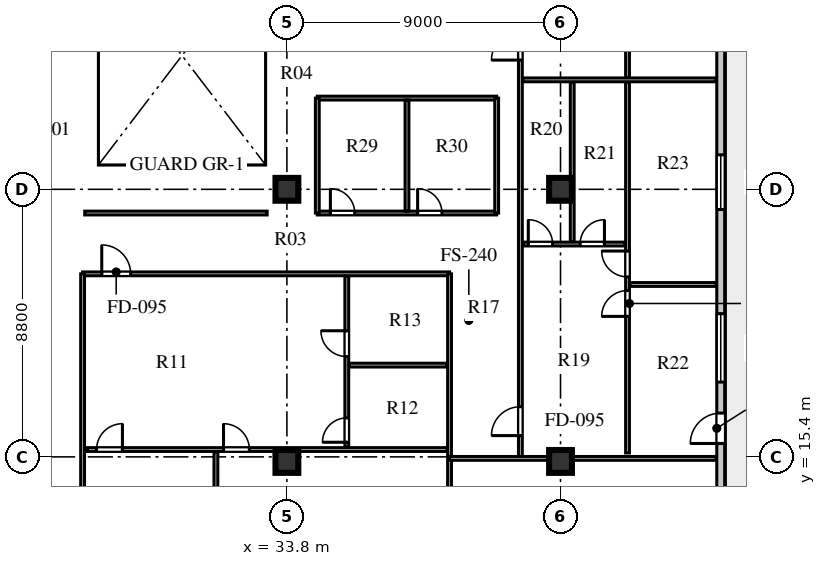
"""IFC4 building model, lengths in metres.
Left out: names, types, materials, properties, quantities, classifications, styles, units other than length and angle.
Written with IfcOpenShell. Run it as: python <this file> out.ifc"""

import sys

from ifc_helpers import new_model, si_unit, direction, frame, frame_2d, origin, origin_2d, place, context, subcontext, project, spatial, rectangle, extrude, element, fill, save


model = new_model("IFC4")
c1 = context("Model", 3, precision=1e-05, world=origin(), true_north=direction((0.0, 1.0)))
c2 = subcontext(c1, "Body", "Model", "MODEL_VIEW")
j1 = project(units=[si_unit("LENGTHUNIT", "METRE"), si_unit("PLANEANGLEUNIT", "RADIAN")], contexts=[c1])
p1 = place(None, origin())
s1 = spatial("IfcSite", under=j1, at=p1, CompositionType="ELEMENT")
p2 = place(p1, origin())
s2 = spatial("IfcBuilding", under=s1, at=p2, CompositionType="ELEMENT")
p3 = place(p2, frame((0.0, 0.0, 280.4)))
s3 = spatial("IfcBuildingStorey", under=s2, at=p3, CompositionType="ELEMENT", Elevation=280.4)
for number, where, z_axis, x_axis in (
    (1, (33.8, 15.25, 0.0), (0.0, 0.0, 1.0), (1.0, 0.0, 0.0)),
    (2, (33.8, 24.2, 0.0), (0.0, 0.0, 1.0), (1.0, 0.0, 0.0)),
    (3, (42.8, 15.25, 0.0), (0.0, 0.0, 1.0), (1.0, 0.0, 0.0)),
    (4, (42.8, 24.2, 0.0), (0.0, 0.0, 1.0), (1.0, 0.0, 0.0)),
):
    element("IfcColumn", number, at=place(p3, frame(where, z_axis=z_axis, x_axis=x_axis)), inside=s3, PredefinedType="COLUMN", context=c2, shape_type="SweptSolid", body=[
        extrude(rectangle(XDim=0.75, YDim=0.75, at=origin_2d()), origin(), (0.0, 0.0, 1.0), 3.66),
    ])
p4 = place(p3, frame((48.07, 13.41, 0.0), z_axis=(0.0, 0.0, 1.0), x_axis=(0.0, 1.0, 0.0)))
e5 = element("IfcWall", 5, at=p4, inside=s3, PredefinedType="SOLIDWALL", context=c2, shape_type="SweptSolid", body=[
    extrude(rectangle(XDim=30.38, YDim=0.26, at=frame_2d((15.19, 0.0))), origin(), (0.0, 0.0, 1.0), 3.66),
])
p5 = place(p4, frame((2.43, 0.0, 0.0)))
e6 = element("IfcOpeningElement", 6, at=p5, cuts=e5, PredefinedType="OPENING", context=c2, shape_type="SweptSolid", body=[
    extrude(rectangle(XDim=1.0, YDim=2.05, at=frame_2d((0.5, 1.025))), frame((0.0, 0.14, 0.0), z_axis=(0.0, -1.0, 0.0), x_axis=(1.0, 0.0, 0.0)), (0.0, 0.0, 1.0), 0.28),
])
p6 = place(p4, frame((4.45, 0.0, 0.8)))
e7 = element("IfcOpeningElement", 7, at=p6, cuts=e5, PredefinedType="OPENING", context=c2, shape_type="SweptSolid", body=[
    extrude(rectangle(XDim=2.25, YDim=2.0, at=frame_2d((1.125, 1.0))), frame((0.0, 0.14, 0.0), z_axis=(0.0, -1.0, 0.0), x_axis=(1.0, 0.0, 0.0)), (0.0, 0.0, 1.0), 0.28),
])
p7 = place(p4, frame((10.125, 0.0, 0.8)))
e8 = element("IfcOpeningElement", 8, at=p7, cuts=e5, PredefinedType="OPENING", context=c2, shape_type="SweptSolid", body=[
    extrude(rectangle(XDim=1.8, YDim=2.0, at=frame_2d((0.9, 1.0))), frame((0.0, 0.14, 0.0), z_axis=(0.0, -1.0, 0.0), x_axis=(1.0, 0.0, 0.0)), (0.0, 0.0, 1.0), 0.28),
])
p8 = place(p4, frame((17.128, 0.0, 0.8)))
e9 = element("IfcOpeningElement", 9, at=p8, cuts=e5, PredefinedType="OPENING", context=c2, shape_type="SweptSolid", body=[
    extrude(rectangle(XDim=1.5, YDim=2.0, at=frame_2d((0.75, 1.0))), frame((0.0, 0.14, 0.0), z_axis=(0.0, -1.0, 0.0), x_axis=(1.0, 0.0, 0.0)), (0.0, 0.0, 1.0), 0.28),
])
p9 = place(p4, frame((24.302, 0.0, 0.8)))
e10 = element("IfcOpeningElement", 10, at=p9, cuts=e5, PredefinedType="OPENING", context=c2, shape_type="SweptSolid", body=[
    extrude(rectangle(XDim=1.2, YDim=1.75, at=frame_2d((0.6, 0.875))), frame((0.0, 0.14, 0.0), z_axis=(0.0, -1.0, 0.0), x_axis=(1.0, 0.0, 0.0)), (0.0, 0.0, 1.0), 0.28),
])
p10 = place(p3, frame((27.08, 21.42, 0.0), z_axis=(0.0, 0.0, 1.0), x_axis=(1.0, 0.0, 0.0)))
e11 = element("IfcWall", 11, at=p10, inside=s3, PredefinedType="PLUMBINGWALL", context=c2, shape_type="SweptSolid", body=[
    extrude(rectangle(XDim=12.07, YDim=0.125, at=frame_2d((6.035, 0.0))), origin(), (0.0, 0.0, 1.0), 3.36),
])
p11 = place(p10, frame((0.63, 0.0, 0.0)))
e12 = element("IfcOpeningElement", 12, at=p11, cuts=e11, PredefinedType="OPENING", context=c2, shape_type="SweptSolid", body=[
    extrude(rectangle(XDim=0.95, YDim=2.1, at=frame_2d((0.475, 1.05))), frame((0.0, 0.073, 0.0), z_axis=(0.0, -1.0, 0.0), x_axis=(1.0, 0.0, 0.0)), (0.0, 0.0, 1.0), 0.145),
])
p12 = place(p3, frame((27.08, 10.38, 0.0), z_axis=(0.0, 0.0, 1.0), x_axis=(0.0, 1.0, 0.0)))
e13 = element("IfcWall", 13, at=p12, inside=s3, PredefinedType="PLUMBINGWALL", context=c2, shape_type="SweptSolid", body=[
    extrude(rectangle(XDim=11.04, YDim=0.125, at=frame_2d((5.52, 0.0))), origin(), (0.0, 0.0, 1.0), 3.66),
])
p13 = place(p3, frame((27.15, 23.42, 0.0), z_axis=(0.0, 0.0, 1.0), x_axis=(1.0, 0.0, 0.0)))
e14 = element("IfcWall", 14, at=p13, inside=s3, PredefinedType="PLUMBINGWALL", context=c2, shape_type="SweptSolid", body=[
    extrude(rectangle(XDim=6.0, YDim=0.125, at=frame_2d((3.0, 0.0))), origin(), (0.0, 0.0, 1.0), 3.66),
])
p14 = place(p3, frame((39.15, 10.38, 0.0), z_axis=(0.0, 0.0, 1.0), x_axis=(0.0, 1.0, 0.0)))
e15 = element("IfcWall", 15, at=p14, inside=s3, PredefinedType="PLUMBINGWALL", context=c2, shape_type="SweptSolid", body=[
    extrude(rectangle(XDim=11.04, YDim=0.125, at=frame_2d((5.52, 0.0))), origin(), (0.0, 0.0, 1.0), 3.66),
])
p15 = place(p3, frame((27.24, 15.641, 0.0), z_axis=(0.0, 0.0, 1.0), x_axis=(1.0, 0.0, 0.0)))
e16 = element("IfcWall", 16, at=p15, inside=s3, PredefinedType="PLUMBINGWALL", context=c2, shape_type="SweptSolid", body=[
    extrude(rectangle(XDim=11.83, YDim=0.125, at=frame_2d((5.915, 0.0))), origin(), (0.0, 0.0, 1.0), 3.66),
])
p16 = place(p15, frame((0.3, 0.0, 0.0)))
e17 = element("IfcOpeningElement", 17, at=p16, cuts=e16, PredefinedType="OPENING", context=c2, shape_type="SweptSolid", body=[
    extrude(rectangle(XDim=0.85, YDim=2.08, at=frame_2d((0.425, 1.04))), frame((0.0, 0.073, 0.0), z_axis=(0.0, -1.0, 0.0), x_axis=(1.0, 0.0, 0.0)), (0.0, 0.0, 1.0), 0.145),
])
p17 = place(p15, frame((4.475, 0.0, 0.0)))
e18 = element("IfcOpeningElement", 18, at=p17, cuts=e16, PredefinedType="OPENING", context=c2, shape_type="SweptSolid", body=[
    extrude(rectangle(XDim=0.85, YDim=2.08, at=frame_2d((0.425, 1.04))), frame((0.0, 0.073, 0.0), z_axis=(0.0, -1.0, 0.0), x_axis=(1.0, 0.0, 0.0)), (0.0, 0.0, 1.0), 0.145),
])
p18 = place(p3, frame((35.77, 15.721, 0.0), z_axis=(0.0, 0.0, 1.0), x_axis=(0.0, 1.0, 0.0)))
e19 = element("IfcWall", 19, at=p18, inside=s3, PredefinedType="PLUMBINGWALL", context=c2, shape_type="SweptSolid", body=[
    extrude(rectangle(XDim=5.619, YDim=0.125, at=frame_2d((2.81, 0.0))), origin(), (0.0, 0.0, 1.0), 3.66),
])
p19 = place(p18, frame((0.16, 0.0, 0.0)))
e20 = element("IfcOpeningElement", 20, at=p19, cuts=e19, PredefinedType="OPENING", context=c2, shape_type="SweptSolid", body=[
    extrude(rectangle(XDim=0.8, YDim=2.05, at=frame_2d((0.4, 1.025))), frame((0.0, 0.073, 0.0), z_axis=(0.0, -1.0, 0.0), x_axis=(1.0, 0.0, 0.0)), (0.0, 0.0, 1.0), 0.145),
])
p20 = place(p18, frame((2.977, 0.0, 0.0)))
e21 = element("IfcOpeningElement", 21, at=p20, cuts=e19, PredefinedType="OPENING", context=c2, shape_type="SweptSolid", body=[
    extrude(rectangle(XDim=0.85, YDim=2.08, at=frame_2d((0.425, 1.04))), frame((0.0, 0.073, 0.0), z_axis=(0.0, -1.0, 0.0), x_axis=(1.0, 0.0, 0.0)), (0.0, 0.0, 1.0), 0.145),
])
p21 = place(p3, frame((35.85, 18.418, 0.0), z_axis=(0.0, 0.0, 1.0), x_axis=(1.0, 0.0, 0.0)))
e22 = element("IfcWall", 22, at=p21, inside=s3, PredefinedType="PLUMBINGWALL", context=c2, shape_type="SweptSolid", body=[
    extrude(rectangle(XDim=3.22, YDim=0.125, at=frame_2d((1.61, 0.0))), origin(), (0.0, 0.0, 1.0), 3.36),
])
p22 = place(p3, frame((31.465, 10.38, 0.0), z_axis=(0.0, 0.0, 1.0), x_axis=(0.0, 1.0, 0.0)))
e23 = element("IfcWall", 23, at=p22, inside=s3, PredefinedType="PLUMBINGWALL", context=c2, shape_type="SweptSolid", body=[
    extrude(rectangle(XDim=5.181, YDim=0.125, at=frame_2d((2.591, 0.0))), origin(), (0.0, 0.0, 1.0), 3.66),
])
p23 = place(p3, frame((41.48, 15.35, 0.0), z_axis=(0.0, 0.0, 1.0), x_axis=(0.0, 1.0, 0.0)))
e24 = element("IfcWall", 24, at=p23, inside=s3, PredefinedType="PLUMBINGWALL", context=c2, shape_type="SweptSolid", body=[
    extrude(rectangle(XDim=26.5, YDim=0.125, at=frame_2d((13.25, 0.0))), origin(), (0.0, 0.0, 1.0), 3.66),
])
p24 = place(p23, frame((0.75, 0.0, 0.0)))
e25 = element("IfcOpeningElement", 25, at=p24, cuts=e24, PredefinedType="OPENING", context=c2, shape_type="SweptSolid", body=[
    extrude(rectangle(XDim=0.95, YDim=2.1, at=frame_2d((0.475, 1.05))), frame((0.0, 0.073, 0.0), z_axis=(0.0, -1.0, 0.0), x_axis=(1.0, 0.0, 0.0)), (0.0, 0.0, 1.0), 0.145),
])
p25 = place(p23, frame((13.1, 0.0, 0.0)))
e26 = element("IfcOpeningElement", 26, at=p25, cuts=e24, PredefinedType="OPENING", context=c2, shape_type="SweptSolid", body=[
    extrude(rectangle(XDim=0.95, YDim=2.1, at=frame_2d((0.475, 1.05))), frame((0.0, 0.073, 0.0), z_axis=(0.0, -1.0, 0.0), x_axis=(1.0, 0.0, 0.0)), (0.0, 0.0, 1.0), 0.145),
])
p26 = place(p3, frame((39.15, 15.35, 0.0), z_axis=(0.0, 0.0, 1.0), x_axis=(1.0, 0.0, 0.0)))
e27 = element("IfcWall", 27, at=p26, inside=s3, PredefinedType="PLUMBINGWALL", context=c2, shape_type="SweptSolid", body=[
    extrude(rectangle(XDim=8.77, YDim=0.125, at=frame_2d((4.385, 0.0))), origin(), (0.0, 0.0, 1.0), 3.06),
])
p27 = place(p3, frame((45.004, 15.53, 0.0), z_axis=(0.0, 0.0, 1.0), x_axis=(0.0, 1.0, 0.0)))
e28 = element("IfcWall", 28, at=p27, inside=s3, PredefinedType="PLUMBINGWALL", context=c2, shape_type="SweptSolid", body=[
    extrude(rectangle(XDim=12.19, YDim=0.125, at=frame_2d((6.095, 0.0))), origin(), (0.0, 0.0, 1.0), 3.66),
])
p28 = place(p27, frame((4.49, 0.0, 0.0)))
e29 = element("IfcOpeningElement", 29, at=p28, cuts=e28, PredefinedType="OPENING", context=c2, shape_type="SweptSolid", body=[
    extrude(rectangle(XDim=0.85, YDim=2.08, at=frame_2d((0.425, 1.04))), frame((0.0, 0.073, 0.0), z_axis=(0.0, -1.0, 0.0), x_axis=(1.0, 0.0, 0.0)), (0.0, 0.0, 1.0), 0.145),
])
p29 = place(p27, frame((5.79, 0.0, 0.0)))
e30 = element("IfcOpeningElement", 30, at=p29, cuts=e28, PredefinedType="OPENING", context=c2, shape_type="SweptSolid", body=[
    extrude(rectangle(XDim=0.85, YDim=2.08, at=frame_2d((0.425, 1.04))), frame((0.0, 0.073, 0.0), z_axis=(0.0, -1.0, 0.0), x_axis=(1.0, 0.0, 0.0)), (0.0, 0.0, 1.0), 0.145),
])
p30 = place(p3, frame((41.58, 22.4, 0.0), z_axis=(0.0, 0.0, 1.0), x_axis=(1.0, 0.0, 0.0)))
e31 = element("IfcWall", 31, at=p30, inside=s3, PredefinedType="PLUMBINGWALL", context=c2, shape_type="SweptSolid", body=[
    extrude(rectangle(XDim=3.344, YDim=0.125, at=frame_2d((1.672, 0.0))), origin(), (0.0, 0.0, 1.0), 3.66),
])
p31 = place(p30, frame((0.16, 0.0, 0.0)))
e32 = element("IfcOpeningElement", 32, at=p31, cuts=e31, PredefinedType="OPENING", context=c2, shape_type="SweptSolid", body=[
    extrude(rectangle(XDim=0.8, YDim=2.05, at=frame_2d((0.4, 1.025))), frame((0.0, 0.073, 0.0), z_axis=(0.0, -1.0, 0.0), x_axis=(1.0, 0.0, 0.0)), (0.0, 0.0, 1.0), 0.145),
])
p32 = place(p30, frame((1.865, 0.0, 0.0)))
e33 = element("IfcOpeningElement", 33, at=p32, cuts=e31, PredefinedType="OPENING", context=c2, shape_type="SweptSolid", body=[
    extrude(rectangle(XDim=0.8, YDim=2.05, at=frame_2d((0.4, 1.025))), frame((0.0, 0.073, 0.0), z_axis=(0.0, -1.0, 0.0), x_axis=(1.0, 0.0, 0.0)), (0.0, 0.0, 1.0), 0.145),
])
p33 = place(p3, frame((43.185, 22.48, 0.0), z_axis=(0.0, 0.0, 1.0), x_axis=(0.0, 1.0, 0.0)))
e34 = element("IfcWall", 34, at=p33, inside=s3, PredefinedType="PLUMBINGWALL", context=c2, shape_type="SweptSolid", body=[
    extrude(rectangle(XDim=5.24, YDim=0.125, at=frame_2d((2.62, 0.0))), origin(), (0.0, 0.0, 1.0), 3.66),
])
p34 = place(p3, frame((45.084, 21.07, 0.0), z_axis=(0.0, 0.0, 1.0), x_axis=(1.0, 0.0, 0.0)))
e35 = element("IfcWall", 35, at=p34, inside=s3, PredefinedType="PLUMBINGWALL", context=c2, shape_type="SweptSolid", body=[
    extrude(rectangle(XDim=2.836, YDim=0.125, at=frame_2d((1.418, 0.0))), origin(), (0.0, 0.0, 1.0), 3.66),
])
p35 = place(p3, frame((41.56, 27.8, 0.0), z_axis=(0.0, 0.0, 1.0), x_axis=(1.0, 0.0, 0.0)))
e36 = element("IfcWall", 36, at=p35, inside=s3, PredefinedType="PLUMBINGWALL", context=c2, shape_type="SweptSolid", body=[
    extrude(rectangle(XDim=6.36, YDim=0.125, at=frame_2d((3.18, 0.0))), origin(), (0.0, 0.0, 1.0), 3.66),
])
p36 = place(p3, frame((45.004, 27.88, 0.0), z_axis=(0.0, 0.0, 1.0), x_axis=(0.0, 1.0, 0.0)))
e37 = element("IfcWall", 37, at=p36, inside=s3, PredefinedType="PLUMBINGWALL", context=c2, shape_type="SweptSolid", body=[
    extrude(rectangle(XDim=13.79, YDim=0.125, at=frame_2d((6.895, 0.0))), origin(), (0.0, 0.0, 1.0), 3.66),
])
p37 = place(p36, frame((5.845, 0.0, 0.0)))
e38 = element("IfcOpeningElement", 38, at=p37, cuts=e37, PredefinedType="OPENING", context=c2, shape_type="SweptSolid", body=[
    extrude(rectangle(XDim=0.85, YDim=2.08, at=frame_2d((0.425, 1.04))), frame((0.0, 0.073, 0.0), z_axis=(0.0, -1.0, 0.0), x_axis=(1.0, 0.0, 0.0)), (0.0, 0.0, 1.0), 0.145),
])
p38 = place(p36, frame((7.145, 0.0, 0.0)))
e39 = element("IfcOpeningElement", 39, at=p38, cuts=e37, PredefinedType="OPENING", context=c2, shape_type="SweptSolid", body=[
    extrude(rectangle(XDim=0.85, YDim=2.08, at=frame_2d((0.425, 1.04))), frame((0.0, 0.073, 0.0), z_axis=(0.0, -1.0, 0.0), x_axis=(1.0, 0.0, 0.0)), (0.0, 0.0, 1.0), 0.145),
])
p39 = place(p3, frame((34.8, 23.42, 0.0), z_axis=(0.0, 0.0, 1.0), x_axis=(1.0, 0.0, 0.0)))
e40 = element("IfcWall", 40, at=p39, inside=s3, PredefinedType="PLUMBINGWALL", context=c2, shape_type="SweptSolid", body=[
    extrude(rectangle(XDim=5.9, YDim=0.125, at=frame_2d((2.95, 0.0))), origin(), (0.0, 0.0, 1.0), 3.66),
])
p40 = place(p39, frame((0.43, 0.0, 0.0)))
e41 = element("IfcOpeningElement", 41, at=p40, cuts=e40, PredefinedType="OPENING", context=c2, shape_type="SweptSolid", body=[
    extrude(rectangle(XDim=0.8, YDim=2.05, at=frame_2d((0.4, 1.025))), frame((0.0, 0.073, 0.0), z_axis=(0.0, -1.0, 0.0), x_axis=(1.0, 0.0, 0.0)), (0.0, 0.0, 1.0), 0.145),
])
p41 = place(p39, frame((3.3, 0.0, 0.0)))
e42 = element("IfcOpeningElement", 42, at=p41, cuts=e40, PredefinedType="OPENING", context=c2, shape_type="SweptSolid", body=[
    extrude(rectangle(XDim=0.8, YDim=2.05, at=frame_2d((0.4, 1.025))), frame((0.0, 0.073, 0.0), z_axis=(0.0, -1.0, 0.0), x_axis=(1.0, 0.0, 0.0)), (0.0, 0.0, 1.0), 0.145),
])
p42 = place(p3, frame((34.8, 27.2, 0.0), z_axis=(0.0, 0.0, 1.0), x_axis=(1.0, 0.0, 0.0)))
e43 = element("IfcWall", 43, at=p42, inside=s3, PredefinedType="PLUMBINGWALL", context=c2, shape_type="SweptSolid", body=[
    extrude(rectangle(XDim=5.9, YDim=0.125, at=frame_2d((2.95, 0.0))), origin(), (0.0, 0.0, 1.0), 3.36),
])
for number, where, z_axis, x_axis in (
    (44, (34.8, 23.42, 0.0), (0.0, 0.0, 1.0), (0.0, 1.0, 0.0)),
    (45, (40.7, 23.42, 0.0), (0.0, 0.0, 1.0), (0.0, 1.0, 0.0)),
):
    element("IfcWall", number, at=place(p3, frame(where, z_axis=z_axis, x_axis=x_axis)), inside=s3, PredefinedType="PLUMBINGWALL", context=c2, shape_type="SweptSolid", body=[
        extrude(rectangle(XDim=3.78, YDim=0.125, at=frame_2d((1.89, 0.0))), origin(), (0.0, 0.0, 1.0), 3.66),
    ])
p43 = place(p3, frame((37.75, 23.48, 0.0), z_axis=(0.0, 0.0, 1.0), x_axis=(0.0, 1.0, 0.0)))
e46 = element("IfcWall", 46, at=p43, inside=s3, PredefinedType="PLUMBINGWALL", context=c2, shape_type="SweptSolid", body=[
    extrude(rectangle(XDim=3.66, YDim=0.125, at=frame_2d((1.83, 0.0))), origin(), (0.0, 0.0, 1.0), 3.66),
])
p44 = place(p5, frame((1.0, 0.0, 0.0), z_axis=(0.0, 0.0, 1.0), x_axis=(-1.0, 0.0, 0.0)))
e47 = element("IfcDoor", 47, at=p44, inside=s3, OperationType="SINGLE_SWING_RIGHT", PredefinedType="DOOR", context=c2, shape_type="SweptSolid", body=[
    extrude(rectangle(XDim=1.0, YDim=2.05, at=frame_2d((0.5, 1.025))), frame((0.0, 0.025, 0.0), z_axis=(0.0, -1.0, 0.0), x_axis=(1.0, 0.0, 0.0)), (0.0, 0.0, 1.0), 0.05),
])
fill(e6, e47)
p45 = place(p6, origin())
e48 = element("IfcWindow", 48, at=p45, inside=s3, PartitioningType="SINGLE_PANEL", PredefinedType="WINDOW", context=c2, shape_type="SweptSolid", body=[
    extrude(rectangle(XDim=2.25, YDim=2.0, at=frame_2d((1.125, 1.0))), frame((0.0, 0.03, 0.0), z_axis=(0.0, -1.0, 0.0), x_axis=(1.0, 0.0, 0.0)), (0.0, 0.0, 1.0), 0.06),
])
fill(e7, e48)
p46 = place(p7, origin())
e49 = element("IfcWindow", 49, at=p46, inside=s3, PartitioningType="SINGLE_PANEL", PredefinedType="WINDOW", context=c2, shape_type="SweptSolid", body=[
    extrude(rectangle(XDim=1.8, YDim=2.0, at=frame_2d((0.9, 1.0))), frame((0.0, 0.03, 0.0), z_axis=(0.0, -1.0, 0.0), x_axis=(1.0, 0.0, 0.0)), (0.0, 0.0, 1.0), 0.06),
])
fill(e8, e49)
p47 = place(p19, origin())
e50 = element("IfcDoor", 50, at=p47, inside=s3, OperationType="SINGLE_SWING_LEFT", PredefinedType="DOOR", context=c2, shape_type="SweptSolid", body=[
    extrude(rectangle(XDim=0.8, YDim=2.05, at=frame_2d((0.4, 1.025))), frame((0.0, 0.025, 0.0), z_axis=(0.0, -1.0, 0.0), x_axis=(1.0, 0.0, 0.0)), (0.0, 0.0, 1.0), 0.05),
])
fill(e20, e50)
p48 = place(p20, origin())
e51 = element("IfcDoor", 51, at=p48, inside=s3, OperationType="SINGLE_SWING_RIGHT", PredefinedType="DOOR", context=c2, shape_type="SweptSolid", body=[
    extrude(rectangle(XDim=0.85, YDim=2.08, at=frame_2d((0.425, 1.04))), frame((0.0, 0.025, 0.0), z_axis=(0.0, -1.0, 0.0), x_axis=(1.0, 0.0, 0.0)), (0.0, 0.0, 1.0), 0.05),
])
fill(e21, e51)
p49 = place(p16, frame((0.85, 0.0, 0.0), z_axis=(0.0, 0.0, 1.0), x_axis=(-1.0, 0.0, 0.0)))
e52 = element("IfcDoor", 52, at=p49, inside=s3, OperationType="SINGLE_SWING_LEFT", PredefinedType="DOOR", context=c2, shape_type="SweptSolid", body=[
    extrude(rectangle(XDim=0.85, YDim=2.08, at=frame_2d((0.425, 1.04))), frame((0.0, 0.025, 0.0), z_axis=(0.0, -1.0, 0.0), x_axis=(1.0, 0.0, 0.0)), (0.0, 0.0, 1.0), 0.05),
])
fill(e17, e52)
p50 = place(p17, frame((0.85, 0.0, 0.0), z_axis=(0.0, 0.0, 1.0), x_axis=(-1.0, 0.0, 0.0)))
e53 = element("IfcDoor", 53, at=p50, inside=s3, OperationType="SINGLE_SWING_RIGHT", PredefinedType="DOOR", context=c2, shape_type="SweptSolid", body=[
    extrude(rectangle(XDim=0.85, YDim=2.08, at=frame_2d((0.425, 1.04))), frame((0.0, 0.025, 0.0), z_axis=(0.0, -1.0, 0.0), x_axis=(1.0, 0.0, 0.0)), (0.0, 0.0, 1.0), 0.05),
])
fill(e18, e53)
p51 = place(p11, frame((0.95, 0.0, 0.0), z_axis=(0.0, 0.0, 1.0), x_axis=(-1.0, 0.0, 0.0)))
e54 = element("IfcDoor", 54, at=p51, inside=s3, OperationType="SINGLE_SWING_RIGHT", PredefinedType="DOOR", context=c2, shape_type="SweptSolid", body=[
    extrude(rectangle(XDim=0.95, YDim=2.1, at=frame_2d((0.475, 1.05))), frame((0.0, 0.025, 0.0), z_axis=(0.0, -1.0, 0.0), x_axis=(1.0, 0.0, 0.0)), (0.0, 0.0, 1.0), 0.05),
])
fill(e12, e54)
p52 = place(p31, origin())
e55 = element("IfcDoor", 55, at=p52, inside=s3, OperationType="SINGLE_SWING_LEFT", PredefinedType="DOOR", context=c2, shape_type="SweptSolid", body=[
    extrude(rectangle(XDim=0.8, YDim=2.05, at=frame_2d((0.4, 1.025))), frame((0.0, 0.025, 0.0), z_axis=(0.0, -1.0, 0.0), x_axis=(1.0, 0.0, 0.0)), (0.0, 0.0, 1.0), 0.05),
])
fill(e32, e55)
p53 = place(p32, origin())
e56 = element("IfcDoor", 56, at=p53, inside=s3, OperationType="SINGLE_SWING_RIGHT", PredefinedType="DOOR", context=c2, shape_type="SweptSolid", body=[
    extrude(rectangle(XDim=0.8, YDim=2.05, at=frame_2d((0.4, 1.025))), frame((0.0, 0.025, 0.0), z_axis=(0.0, -1.0, 0.0), x_axis=(1.0, 0.0, 0.0)), (0.0, 0.0, 1.0), 0.05),
])
fill(e33, e56)
p54 = place(p28, origin())
e57 = element("IfcDoor", 57, at=p54, inside=s3, OperationType="SINGLE_SWING_LEFT", PredefinedType="DOOR", context=c2, shape_type="SweptSolid", body=[
    extrude(rectangle(XDim=0.85, YDim=2.08, at=frame_2d((0.425, 1.04))), frame((0.0, 0.025, 0.0), z_axis=(0.0, -1.0, 0.0), x_axis=(1.0, 0.0, 0.0)), (0.0, 0.0, 1.0), 0.05),
])
fill(e29, e57)
p55 = place(p29, origin())
e58 = element("IfcDoor", 58, at=p55, inside=s3, OperationType="SINGLE_SWING_RIGHT", PredefinedType="DOOR", context=c2, shape_type="SweptSolid", body=[
    extrude(rectangle(XDim=0.85, YDim=2.08, at=frame_2d((0.425, 1.04))), frame((0.0, 0.025, 0.0), z_axis=(0.0, -1.0, 0.0), x_axis=(1.0, 0.0, 0.0)), (0.0, 0.0, 1.0), 0.05),
])
fill(e30, e58)
p56 = place(p24, origin())
e59 = element("IfcDoor", 59, at=p56, inside=s3, OperationType="SINGLE_SWING_LEFT", PredefinedType="DOOR", context=c2, shape_type="SweptSolid", body=[
    extrude(rectangle(XDim=0.95, YDim=2.1, at=frame_2d((0.475, 1.05))), frame((0.0, 0.025, 0.0), z_axis=(0.0, -1.0, 0.0), x_axis=(1.0, 0.0, 0.0)), (0.0, 0.0, 1.0), 0.05),
])
fill(e25, e59)
p57 = place(p25, origin())
e60 = element("IfcDoor", 60, at=p57, inside=s3, OperationType="SINGLE_SWING_LEFT", PredefinedType="DOOR", context=c2, shape_type="SweptSolid", body=[
    extrude(rectangle(XDim=0.95, YDim=2.1, at=frame_2d((0.475, 1.05))), frame((0.0, 0.025, 0.0), z_axis=(0.0, -1.0, 0.0), x_axis=(1.0, 0.0, 0.0)), (0.0, 0.0, 1.0), 0.05),
])
fill(e26, e60)
p58 = place(p40, origin())
e61 = element("IfcDoor", 61, at=p58, inside=s3, OperationType="SINGLE_SWING_LEFT", PredefinedType="DOOR", context=c2, shape_type="SweptSolid", body=[
    extrude(rectangle(XDim=0.8, YDim=2.05, at=frame_2d((0.4, 1.025))), frame((0.0, 0.025, 0.0), z_axis=(0.0, -1.0, 0.0), x_axis=(1.0, 0.0, 0.0)), (0.0, 0.0, 1.0), 0.05),
])
fill(e41, e61)
p59 = place(p41, origin())
e62 = element("IfcDoor", 62, at=p59, inside=s3, OperationType="SINGLE_SWING_LEFT", PredefinedType="DOOR", context=c2, shape_type="SweptSolid", body=[
    extrude(rectangle(XDim=0.8, YDim=2.05, at=frame_2d((0.4, 1.025))), frame((0.0, 0.025, 0.0), z_axis=(0.0, -1.0, 0.0), x_axis=(1.0, 0.0, 0.0)), (0.0, 0.0, 1.0), 0.05),
])
fill(e42, e62)
save(model, sys.argv[1])
